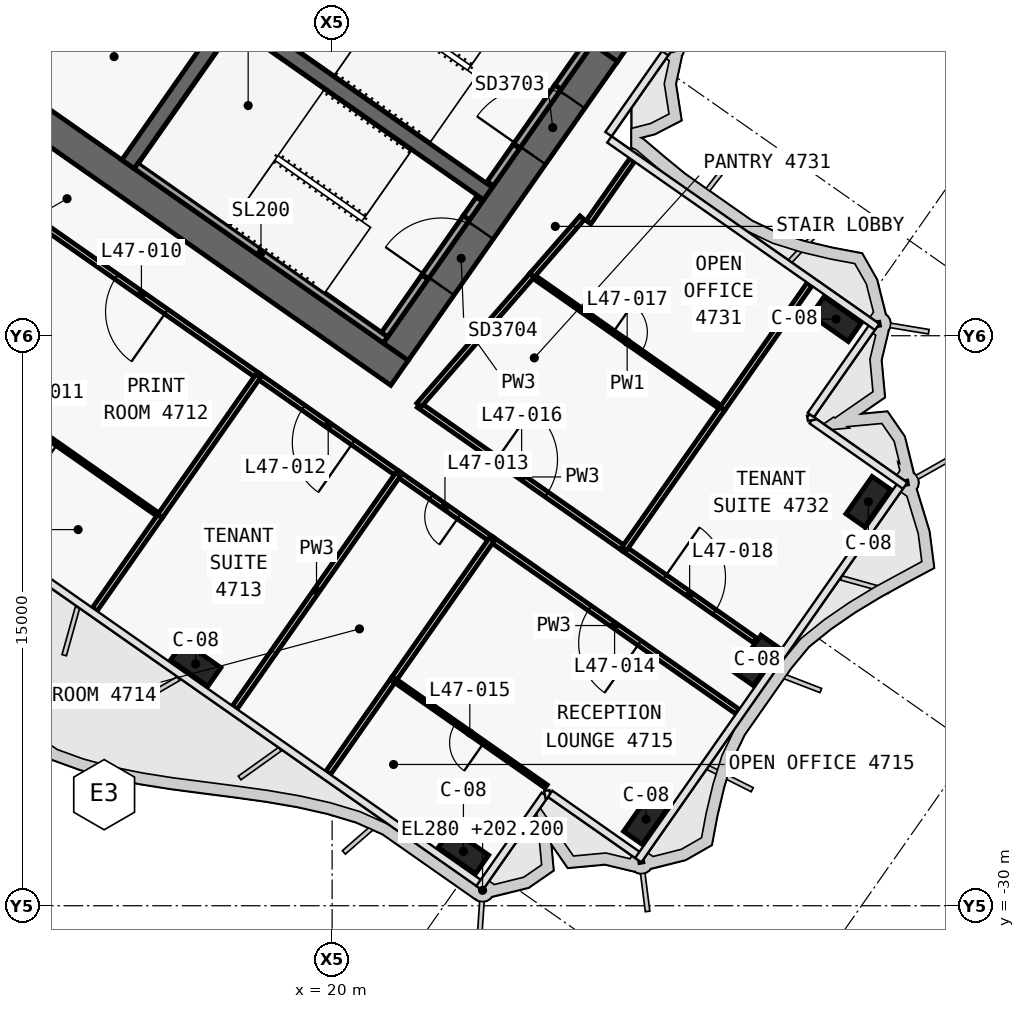
"""IFC4 building model, lengths in metres.
Left out: names, types, materials, properties, quantities, classifications, styles, units other than length and angle.
Written with IfcOpenShell. Run it as: python <this file> out.ifc"""

import sys

from ifc_helpers import new_model, si_unit, direction, frame, frame_2d, origin, origin_2d, place, context, subcontext, project, spatial, polyline, rectangle, outline, extrude, element, fill, save


model = new_model("IFC4")
c1 = context("Model", 3, precision=1e-05, world=origin(), true_north=direction((0.0, 1.0)))
c2 = subcontext(c1, "Body", "Model", "MODEL_VIEW")
j1 = project(units=[si_unit("LENGTHUNIT", "METRE"), si_unit("PLANEANGLEUNIT", "RADIAN")], contexts=[c1])
p1 = place(None, origin())
s1 = spatial("IfcSite", under=j1, at=p1, CompositionType="ELEMENT")
p2 = place(p1, origin())
s2 = spatial("IfcBuilding", under=s1, at=p2, CompositionType="ELEMENT")
p3 = place(p2, frame((0.0, 0.0, 202.2)))
s3 = spatial("IfcBuildingStorey", under=s2, at=p3, CompositionType="ELEMENT", Elevation=202.2)
p4 = place(p3, frame((-0.029, 11.984, 0.0), z_axis=(0.0, 0.0, 1.0), x_axis=(0.819151382952, -0.573577380837, 0.0)))
e1 = element("IfcWall", 1, at=p4, inside=s3, PredefinedType="SHEAR", context=c2, shape_type="SweptSolid", body=[
    extrude(outline(polyline([(33.898, 0.4), (-0.0, 0.4), (0.56, -0.4), (33.898, -0.4), (33.898, 0.4)])), origin(), (0.0, 0.0, 1.0), 3.9),
])
p5 = place(p3, frame((-0.029, -0.712, 0.0), z_axis=(0.0, 0.0, 1.0), x_axis=(0.819151758019, -0.573576845187, 0.0)))
e2 = element("IfcWall", 2, at=p5, inside=s3, PredefinedType="SHEAR", context=c2, shape_type="SweptSolid", body=[
    extrude(outline(polyline([(26.616, 0.4), (-0.0, 0.4), (0.56, -0.4), (26.616, -0.4), (26.616, 0.4)])), origin(), (0.0, 0.0, 1.0), 3.9),
])
p6 = place(p5, frame((0.966, 0.0, 0.0)))
e3 = element("IfcOpeningElement", 3, at=p6, cuts=e2, PredefinedType="OPENING", context=c2, shape_type="SweptSolid", body=[
    extrude(rectangle(XDim=1.5, YDim=2.1, at=frame_2d((0.75, 1.05))), frame((0.0, 0.41, 0.0), z_axis=(0.0, -1.0, 0.0), x_axis=(1.0, 0.0, 0.0)), (0.0, 0.0, 1.0), 0.82),
])
p7 = place(p5, frame((12.366, 0.0, 0.0)))
e4 = element("IfcOpeningElement", 4, at=p7, cuts=e2, PredefinedType="OPENING", context=c2, shape_type="SweptSolid", body=[
    extrude(rectangle(XDim=1.5, YDim=2.1, at=frame_2d((0.75, 1.05))), frame((0.0, 0.41, 0.0), z_axis=(0.0, -1.0, 0.0), x_axis=(1.0, 0.0, 0.0)), (0.0, 0.0, 1.0), 0.82),
])
p8 = place(p3, frame((21.675, -15.421, 0.0), z_axis=(0.0, 0.0, 1.0), x_axis=(0.573581815061, 0.819148278049, 0.0)))
e5 = element("IfcWall", 5, at=p8, inside=s3, PredefinedType="SHEAR", context=c2, shape_type="SweptSolid", body=[
    extrude(outline(polyline([(9.6, 0.4), (0.0, 0.4), (0.0, -0.4), (9.6, -0.4), (9.6, 0.4)])), origin(), (0.0, 0.0, 1.0), 3.9),
])
p9 = place(p8, frame((6.3, 0.0, 0.0)))
e6 = element("IfcOpeningElement", 6, at=p9, cuts=e5, PredefinedType="OPENING", context=c2, shape_type="SweptSolid", body=[
    extrude(rectangle(XDim=1.8, YDim=2.1, at=frame_2d((0.9, 1.05))), frame((0.0, 0.41, 0.0), z_axis=(0.0, -1.0, 0.0), x_axis=(1.0, 0.0, 0.0)), (0.0, 0.0, 1.0), 0.82),
])
p10 = place(p8, frame((2.1, 0.0, 0.0)))
e7 = element("IfcOpeningElement", 7, at=p10, cuts=e5, PredefinedType="OPENING", context=c2, shape_type="SweptSolid", body=[
    extrude(rectangle(XDim=1.8, YDim=2.1, at=frame_2d((0.9, 1.05))), frame((0.0, 0.41, 0.0), z_axis=(0.0, -1.0, 0.0), x_axis=(1.0, 0.0, 0.0)), (0.0, 0.0, 1.0), 0.82),
])
p11 = place(p3, frame((14.63, -10.488, 0.0), z_axis=(0.0, 0.0, 1.0), x_axis=(0.573611936273, 0.819127185829, 0.0)))
e8 = element("IfcWall", 8, at=p11, inside=s3, PredefinedType="SHEAR", context=c2, shape_type="SweptSolid", body=[
    extrude(outline(polyline([(0.0, 0.2), (0.0, -0.2), (4.6, -0.2), (4.6, 0.2), (0.0, 0.2)])), origin(), (0.0, 0.0, 1.0), 3.9),
])
p12 = place(p3, frame((2.638, 3.768, 0.0), z_axis=(0.0, 0.0, 1.0), x_axis=(0.81915267502, -0.573575535572, 0.0)))
e9 = element("IfcWall", 9, at=p12, inside=s3, PredefinedType="SHEAR", context=c2, shape_type="SweptSolid", body=[
    extrude(outline(polyline([(0.0, 0.2), (0.0, -0.2), (26.2, -0.2), (26.2, 0.2), (0.0, 0.2)])), origin(), (0.0, 0.0, 1.0), 3.9),
])
p13 = place(p12, frame((9.637, 0.0, 0.0)))
e10 = element("IfcOpeningElement", 10, at=p13, cuts=e9, PredefinedType="OPENING", context=c2, shape_type="SweptSolid", body=[
    extrude(rectangle(XDim=1.2, YDim=2.1, at=frame_2d((0.6, 1.05))), frame((0.0, 0.21, 0.0), z_axis=(0.0, -1.0, 0.0), x_axis=(1.0, 0.0, 0.0)), (0.0, 0.0, 1.0), 0.42),
])
p14 = place(p12, frame((11.812, 0.0, 0.0)))
e11 = element("IfcOpeningElement", 11, at=p14, cuts=e9, PredefinedType="OPENING", context=c2, shape_type="SweptSolid", body=[
    extrude(rectangle(XDim=1.2, YDim=2.1, at=frame_2d((0.6, 1.05))), frame((0.0, 0.21, 0.0), z_axis=(0.0, -1.0, 0.0), x_axis=(1.0, 0.0, 0.0)), (0.0, 0.0, 1.0), 0.42),
])
p15 = place(p12, frame((13.988, 0.0, 0.0)))
e12 = element("IfcOpeningElement", 12, at=p15, cuts=e9, PredefinedType="OPENING", context=c2, shape_type="SweptSolid", body=[
    extrude(rectangle(XDim=1.2, YDim=2.1, at=frame_2d((0.6, 1.05))), frame((0.0, 0.21, 0.0), z_axis=(0.0, -1.0, 0.0), x_axis=(1.0, 0.0, 0.0)), (0.0, 0.0, 1.0), 0.42),
])
p16 = place(p12, frame((16.262, 0.0, 0.0)))
e13 = element("IfcOpeningElement", 13, at=p16, cuts=e9, PredefinedType="OPENING", context=c2, shape_type="SweptSolid", body=[
    extrude(rectangle(XDim=1.0, YDim=2.1, at=frame_2d((0.5, 1.05))), frame((0.0, 0.21, 0.0), z_axis=(0.0, -1.0, 0.0), x_axis=(1.0, 0.0, 0.0)), (0.0, 0.0, 1.0), 0.42),
])
for number, where, z_axis, x_axis in (
    (14, (16.41, -23.637, 0.0), (0.0, 0.0, 1.0), (0.819, -0.574, 0.0)),
    (15, (23.455, -28.57, 0.0), (0.0, 0.0, 1.0), (0.819, -0.574, 0.0)),
    (16, (33.263, -14.562, 0.0), (0.0, 0.0, 1.0), (0.819, -0.574, 0.0)),
    (17, (28.26, -27.723, 0.0), (0.0, 0.0, 1.0), (0.574, 0.819, 0.0)),
    (18, (31.185, -23.545, 0.0), (0.0, 0.0, 1.0), (0.574, 0.819, 0.0)),
    (19, (34.11, -19.367, 0.0), (0.0, 0.0, 1.0), (0.574, 0.819, 0.0)),
):
    element("IfcColumn", number, at=place(p3, frame(where, z_axis=z_axis, x_axis=x_axis)), inside=s3, PredefinedType="COLUMN", context=c2, shape_type="SweptSolid", body=[
        extrude(rectangle(XDim=1.2, YDim=0.6, at=origin_2d()), origin(), (0.0, 0.0, 1.0), 3.9),
    ])
p17 = place(p3, frame((24.162, -10.998, 0.0), z_axis=(0.0, 0.0, 1.0), x_axis=(0.573612502218, 0.819126789514, 0.0)))
e20 = element("IfcWall", 20, at=p17, inside=s3, PredefinedType="SOLIDWALL", context=c2, shape_type="SweptSolid", body=[
    extrude(rectangle(XDim=1.2, YDim=0.2, at=frame_2d((0.6, 0.0))), origin(), (0.0, 0.0, 1.0), 3.62),
])
p18 = place(p3, frame((25.94, -8.458, 0.0), z_axis=(0.0, 0.0, 1.0), x_axis=(0.573619628835, 0.819121798889, 0.0)))
e21 = element("IfcWall", 21, at=p18, inside=s3, PredefinedType="SOLIDWALL", context=c2, shape_type="SweptSolid", body=[
    extrude(rectangle(XDim=1.25, YDim=0.2, at=frame_2d((0.625, 0.0))), origin(), (0.0, 0.0, 1.0), 3.62),
])
p19 = place(p3, frame((24.85, -10.014, 2.15), z_axis=(0.0, 0.0, 1.0), x_axis=(0.573505465124, 0.819201734296, 0.0)))
e22 = element("IfcWall", 22, at=p19, inside=s3, PredefinedType="SOLIDWALL", context=c2, shape_type="SweptSolid", body=[
    extrude(rectangle(XDim=1.9, YDim=0.2, at=frame_2d((0.95, 0.0))), origin(), (0.0, 0.0, 1.0), 1.47),
])
p20 = place(p3, frame((14.851, -10.521, 0.0), z_axis=(0.0, 0.0, 1.0), x_axis=(0.819141584393, -0.57359137434, 0.0)))
e23 = element("IfcWall", 23, at=p20, inside=s3, PredefinedType="SOLIDWALL", context=c2, shape_type="SweptSolid", body=[
    extrude(rectangle(XDim=8.0, YDim=0.2, at=frame_2d((4.0, 0.0))), origin(), (0.0, 0.0, 1.0), 3.62),
])
p21 = place(p3, frame((21.38, -14.97, 0.0), z_axis=(0.0, 0.0, 1.0), x_axis=(0.573559770908, 0.819163713305, 0.0)))
e24 = element("IfcWall", 24, at=p21, inside=s3, PredefinedType="SOLIDWALL", context=c2, shape_type="SweptSolid", body=[
    extrude(rectangle(XDim=1.85, YDim=0.2, at=frame_2d((0.925, 0.0))), origin(), (0.0, 0.0, 1.0), 3.62),
])
p22 = place(p3, frame((23.531, -11.898, 0.0), z_axis=(0.0, 0.0, 1.0), x_axis=(0.573708088123, 0.819059844958, 0.0)))
e25 = element("IfcWall", 25, at=p22, inside=s3, PredefinedType="SOLIDWALL", context=c2, shape_type="SweptSolid", body=[
    extrude(rectangle(XDim=0.6, YDim=0.2, at=frame_2d((0.3, 0.0))), origin(), (0.0, 0.0, 1.0), 3.62),
])
p23 = place(p3, frame((22.441, -13.455, 2.15), z_axis=(0.0, 0.0, 1.0), x_axis=(0.573591692345, 0.819141361715, 0.0)))
e26 = element("IfcWall", 26, at=p23, inside=s3, PredefinedType="SOLIDWALL", context=c2, shape_type="SweptSolid", body=[
    extrude(rectangle(XDim=1.9, YDim=0.2, at=frame_2d((0.95, 0.0))), origin(), (0.0, 0.0, 1.0), 1.47),
])
p24 = place(p3, frame((22.283, -16.824, 0.0), z_axis=(0.0, 0.0, 1.0), x_axis=(0.819157174053, -0.573569110219, 0.0)))
e27 = element("IfcWall", 27, at=p24, inside=s3, PredefinedType="PARTITIONING", context=c2, shape_type="SweptSolid", body=[
    extrude(rectangle(XDim=6.599, YDim=0.15, at=frame_2d((3.299, 0.0))), origin(), (0.0, 0.0, 1.0), 3.62),
])
p25 = place(p24, frame((2.5, 0.0, 0.0)))
e28 = element("IfcOpeningElement", 28, at=p25, cuts=e27, PredefinedType="OPENING", context=c2, shape_type="SweptSolid", body=[
    extrude(rectangle(XDim=1.6, YDim=2.1, at=frame_2d((0.8, 1.05))), frame((0.0, 0.085, 0.0), z_axis=(0.0, -1.0, 0.0), x_axis=(1.0, 0.0, 0.0)), (0.0, 0.0, 1.0), 0.17),
])
p26 = place(p3, frame((27.686, -20.606, 0.0), z_axis=(0.0, 0.0, 1.0), x_axis=(0.81915821587, -0.573567622319, 0.0)))
e29 = element("IfcWall", 29, at=p26, inside=s3, PredefinedType="PARTITIONING", context=c2, shape_type="SweptSolid", body=[
    extrude(rectangle(XDim=4.202, YDim=0.15, at=frame_2d((2.101, 0.0))), origin(), (0.0, 0.0, 1.0), 3.0),
])
p27 = place(p26, frame((1.301, 0.0, 0.0)))
e30 = element("IfcOpeningElement", 30, at=p27, cuts=e29, PredefinedType="OPENING", context=c2, shape_type="SweptSolid", body=[
    extrude(rectangle(XDim=1.6, YDim=2.1, at=frame_2d((0.8, 1.05))), frame((0.0, 0.085, 0.0), z_axis=(0.0, -1.0, 0.0), x_axis=(1.0, 0.0, 0.0)), (0.0, 0.0, 1.0), 0.17),
])
p28 = place(p3, frame((18.055, -16.061, 0.0), z_axis=(0.0, 0.0, 1.0), x_axis=(-0.819164661457, 0.573558416746, 0.0)))
e31 = element("IfcWall", 31, at=p28, inside=s3, PredefinedType="PARTITIONING", context=c2, shape_type="SweptSolid", body=[
    extrude(rectangle(XDim=7.504, YDim=0.15, at=frame_2d((3.752, 0.0))), origin(), (0.0, 0.0, 1.0), 3.0),
])
p29 = place(p28, frame((2.952, 0.0, 0.0)))
e32 = element("IfcOpeningElement", 32, at=p29, cuts=e31, PredefinedType="OPENING", context=c2, shape_type="SweptSolid", body=[
    extrude(rectangle(XDim=1.6, YDim=2.1, at=frame_2d((0.8, 1.05))), frame((0.0, 0.085, 0.0), z_axis=(0.0, -1.0, 0.0), x_axis=(1.0, 0.0, 0.0)), (0.0, 0.0, 1.0), 0.17),
])
p30 = place(p3, frame((21.741, -18.642, 0.0), z_axis=(0.0, 0.0, 1.0), x_axis=(-0.819165703328, 0.573556928727, 0.0)))
e33 = element("IfcWall", 33, at=p30, inside=s3, PredefinedType="PARTITIONING", context=c2, shape_type="SweptSolid", body=[
    extrude(rectangle(XDim=4.504, YDim=0.15, at=frame_2d((2.252, 0.0))), origin(), (0.0, 0.0, 1.0), 3.0),
])
p31 = place(p30, frame((1.452, 0.0, 0.0)))
e34 = element("IfcOpeningElement", 34, at=p31, cuts=e33, PredefinedType="OPENING", context=c2, shape_type="SweptSolid", body=[
    extrude(rectangle(XDim=1.6, YDim=2.1, at=frame_2d((0.8, 1.05))), frame((0.0, 0.085, 0.0), z_axis=(0.0, -1.0, 0.0), x_axis=(1.0, 0.0, 0.0)), (0.0, 0.0, 1.0), 0.17),
])
p32 = place(p3, frame((24.199, -20.362, 0.0), z_axis=(0.0, 0.0, 1.0), x_axis=(-0.81916700466, 0.573555070134, 0.0)))
e35 = element("IfcWall", 35, at=p32, inside=s3, PredefinedType="PARTITIONING", context=c2, shape_type="SweptSolid", body=[
    extrude(rectangle(XDim=3.004, YDim=0.15, at=frame_2d((1.502, 0.0))), origin(), (0.0, 0.0, 1.0), 3.62),
])
p33 = place(p32, frame((1.052, 0.0, 0.0)))
e36 = element("IfcOpeningElement", 36, at=p33, cuts=e35, PredefinedType="OPENING", context=c2, shape_type="SweptSolid", body=[
    extrude(rectangle(XDim=0.9, YDim=2.1, at=frame_2d((0.45, 1.05))), frame((0.0, 0.085, 0.0), z_axis=(0.0, -1.0, 0.0), x_axis=(1.0, 0.0, 0.0)), (0.0, 0.0, 1.0), 0.17),
])
p34 = place(p3, frame((30.669, -24.893, 0.0), z_axis=(0.0, 0.0, 1.0), x_axis=(-0.8191564378, 0.573570161716, 0.0)))
e37 = element("IfcWall", 37, at=p34, inside=s3, PredefinedType="PARTITIONING", context=c2, shape_type="SweptSolid", body=[
    extrude(rectangle(XDim=7.902, YDim=0.15, at=frame_2d((3.951, 0.0))), origin(), (0.0, 0.0, 1.0), 2.9),
])
p35 = place(p34, frame((3.151, 0.0, 0.0)))
e38 = element("IfcOpeningElement", 38, at=p35, cuts=e37, PredefinedType="OPENING", context=c2, shape_type="SweptSolid", body=[
    extrude(rectangle(XDim=1.6, YDim=2.1, at=frame_2d((0.8, 1.05))), frame((0.0, 0.085, 0.0), z_axis=(0.0, -1.0, 0.0), x_axis=(1.0, 0.0, 0.0)), (0.0, 0.0, 1.0), 0.17),
])
p36 = place(p3, frame((25.258, -13.412, 0.0), z_axis=(0.0, 0.0, 1.0), x_axis=(0.819160668254, -0.573564119855, 0.0)))
e39 = element("IfcWall", 39, at=p36, inside=s3, PredefinedType="PARTITIONING", context=c2, shape_type="SweptSolid", body=[
    extrude(rectangle(XDim=6.117, YDim=0.1, at=frame_2d((3.059, 0.0))), origin(), (0.0, 0.0, 1.0), 3.62),
])
p37 = place(p36, frame((2.609, 0.0, 0.0)))
e40 = element("IfcOpeningElement", 40, at=p37, cuts=e39, PredefinedType="OPENING", context=c2, shape_type="SweptSolid", body=[
    extrude(rectangle(XDim=0.9, YDim=2.1, at=frame_2d((0.45, 1.05))), frame((0.0, 0.06, 0.0), z_axis=(0.0, -1.0, 0.0), x_axis=(1.0, 0.0, 0.0)), (0.0, 0.0, 1.0), 0.12),
])
p38 = place(p3, frame((32.562, -13.645, 0.0), z_axis=(0.0, 0.0, 1.0), x_axis=(-0.573589359699, -0.819142995112, 0.0)))
e41 = element("IfcWall", 41, at=p38, inside=s3, PredefinedType="PARTITIONING", context=c2, shape_type="SweptSolid", body=[
    extrude(rectangle(XDim=3.999, YDim=0.15, at=frame_2d((2.0, 0.0))), origin(), (0.0, 0.0, 1.0), 3.0),
])
p39 = place(p3, frame((25.258, -13.412, 0.0), z_axis=(0.0, 0.0, 1.0), x_axis=(0.656791883473, 0.75407189432, 0.0)))
e42 = element("IfcWall", 42, at=p39, inside=s3, PredefinedType="PARTITIONING", context=c2, shape_type="SweptSolid", body=[
    extrude(rectangle(XDim=2.01, YDim=0.15, at=frame_2d((1.005, 0.0))), origin(), (0.0, 0.0, 1.0), 3.62),
])
p40 = place(p3, frame((26.746, -12.014, 0.0), z_axis=(0.0, 0.0, 1.0), x_axis=(0.573568836472, 0.819157365729, 0.0)))
e43 = element("IfcWall", 43, at=p40, inside=s3, PredefinedType="PARTITIONING", context=c2, shape_type="SweptSolid", body=[
    extrude(rectangle(XDim=2.0, YDim=0.15, at=frame_2d((1.0, 0.0))), origin(), (0.0, 0.0, 1.0), 3.0),
])
p41 = place(p3, frame((30.268, -16.921, 0.0), z_axis=(0.0, 0.0, 1.0), x_axis=(-0.573586141663, -0.819145248471, 0.0)))
e44 = element("IfcWall", 44, at=p41, inside=s3, PredefinedType="PARTITIONING", context=c2, shape_type="SweptSolid", body=[
    extrude(rectangle(XDim=4.5, YDim=0.15, at=frame_2d((2.25, 0.0))), origin(), (0.0, 0.0, 1.0), 3.62),
])
p42 = place(p3, frame((22.285, -16.825, 0.0), z_axis=(0.0, 0.0, 1.0), x_axis=(0.656764910052, 0.754095387152, 0.0)))
e45 = element("IfcWall", 45, at=p42, inside=s3, PredefinedType="PARTITIONING", context=c2, shape_type="SweptSolid", body=[
    extrude(rectangle(XDim=4.525, YDim=0.15, at=frame_2d((2.263, 0.0))), origin(), (0.0, 0.0, 1.0), 3.62),
])
p43 = place(p3, frame((15.472, -19.747, 0.0), z_axis=(0.0, 0.0, 1.0), x_axis=(-0.819137093595, 0.573597787563, 0.0)))
e46 = element("IfcWall", 46, at=p43, inside=s3, PredefinedType="PARTITIONING", context=c2, shape_type="SweptSolid", body=[
    extrude(rectangle(XDim=7.5, YDim=0.1, at=frame_2d((3.75, 0.0))), origin(), (0.0, 0.0, 1.0), 3.0),
])
p44 = place(p43, frame((3.3, 0.0, 0.0)))
e47 = element("IfcOpeningElement", 47, at=p44, cuts=e46, PredefinedType="OPENING", context=c2, shape_type="SweptSolid", body=[
    extrude(rectangle(XDim=0.9, YDim=2.1, at=frame_2d((0.45, 1.05))), frame((0.0, 0.06, 0.0), z_axis=(0.0, -1.0, 0.0), x_axis=(1.0, 0.0, 0.0)), (0.0, 0.0, 1.0), 0.12),
])
p45 = place(p3, frame((15.472, -19.747, 0.0), z_axis=(0.0, 0.0, 1.0), x_axis=(-0.573604390867, -0.819132469615, 0.0)))
e48 = element("IfcWall", 48, at=p45, inside=s3, PredefinedType="PARTITIONING", context=c2, shape_type="SweptSolid", body=[
    extrude(rectangle(XDim=2.999, YDim=0.15, at=frame_2d((1.5, 0.0))), origin(), (0.0, 0.0, 1.0), 2.9),
])
p46 = place(p3, frame((18.054, -16.06, 0.0), z_axis=(0.0, 0.0, 1.0), x_axis=(-0.573622545156, -0.819119756622, 0.0)))
e49 = element("IfcWall", 49, at=p46, inside=s3, PredefinedType="PARTITIONING", context=c2, shape_type="SweptSolid", body=[
    extrude(rectangle(XDim=4.5, YDim=0.15, at=frame_2d((2.25, 0.0))), origin(), (0.0, 0.0, 1.0), 3.62),
])
p47 = place(p3, frame((21.74, -18.641, 0.0), z_axis=(0.0, 0.0, 1.0), x_axis=(-0.573575945067, -0.81915238829, 0.0)))
e50 = element("IfcWall", 50, at=p47, inside=s3, PredefinedType="PARTITIONING", context=c2, shape_type="SweptSolid", body=[
    extrude(rectangle(XDim=7.5, YDim=0.15, at=frame_2d((3.75, 0.0))), origin(), (0.0, 0.0, 1.0), 2.9),
])
p48 = place(p3, frame((21.617, -24.047, 0.0), z_axis=(0.0, 0.0, 1.0), x_axis=(-0.573555162214, -0.819166940189, 0.0)))
e51 = element("IfcWall", 51, at=p48, inside=s3, PredefinedType="PARTITIONING", context=c2, shape_type="SweptSolid", body=[
    extrude(rectangle(XDim=3.001, YDim=0.15, at=frame_2d((1.5, 0.0))), origin(), (0.0, 0.0, 1.0), 2.9),
])
p49 = place(p3, frame((24.197, -20.361, 0.0), z_axis=(0.0, 0.0, 1.0), x_axis=(-0.573589723117, -0.819142740634, 0.0)))
e52 = element("IfcWall", 52, at=p49, inside=s3, PredefinedType="PARTITIONING", context=c2, shape_type="SweptSolid", body=[
    extrude(rectangle(XDim=4.502, YDim=0.15, at=frame_2d((2.251, 0.0))), origin(), (0.0, 0.0, 1.0), 3.62),
])
p50 = place(p3, frame((25.629, -26.859, 0.0), z_axis=(0.0, 0.0, 1.0), x_axis=(-0.819154669329, 0.573572687386, 0.0)))
e53 = element("IfcWall", 53, at=p50, inside=s3, PredefinedType="PARTITIONING", context=c2, shape_type="SweptSolid", body=[
    extrude(rectangle(XDim=4.9, YDim=0.1, at=frame_2d((2.45, 0.0))), origin(), (0.0, 0.0, 1.0), 3.0),
])
p51 = place(p50, frame((2.0, 0.0, 0.0)))
e54 = element("IfcOpeningElement", 54, at=p51, cuts=e53, PredefinedType="OPENING", context=c2, shape_type="SweptSolid", body=[
    extrude(rectangle(XDim=0.9, YDim=2.1, at=frame_2d((0.45, 1.05))), frame((0.0, 0.06, 0.0), z_axis=(0.0, -1.0, 0.0), x_axis=(1.0, 0.0, 0.0)), (0.0, 0.0, 1.0), 0.12),
])
p52 = place(p9, origin())
e55 = element("IfcDoor", 55, at=p52, inside=s3, OperationType="DOUBLE_DOOR_SINGLE_SWING", PredefinedType="DOOR", context=c2, shape_type="SweptSolid", body=[
    extrude(rectangle(XDim=1.8, YDim=2.1, at=frame_2d((0.9, 1.05))), frame((0.0, 0.025, 0.0), z_axis=(0.0, -1.0, 0.0), x_axis=(1.0, 0.0, 0.0)), (0.0, 0.0, 1.0), 0.05),
])
fill(e6, e55)
p53 = place(p10, origin())
e56 = element("IfcDoor", 56, at=p53, inside=s3, OperationType="DOUBLE_DOOR_SINGLE_SWING", PredefinedType="DOOR", context=c2, shape_type="SweptSolid", body=[
    extrude(rectangle(XDim=1.8, YDim=2.1, at=frame_2d((0.9, 1.05))), frame((0.0, 0.025, 0.0), z_axis=(0.0, -1.0, 0.0), x_axis=(1.0, 0.0, 0.0)), (0.0, 0.0, 1.0), 0.05),
])
fill(e7, e56)
p54 = place(p29, origin())
e57 = element("IfcDoor", 57, at=p54, inside=s3, OperationType="DOUBLE_DOOR_SINGLE_SWING", PredefinedType="DOOR", context=c2, shape_type="SweptSolid", body=[
    extrude(rectangle(XDim=1.6, YDim=2.1, at=frame_2d((0.8, 1.05))), frame((0.0, 0.025, 0.0), z_axis=(0.0, -1.0, 0.0), x_axis=(1.0, 0.0, 0.0)), (0.0, 0.0, 1.0), 0.05),
])
fill(e32, e57)
p55 = place(p44, origin())
e58 = element("IfcDoor", 58, at=p55, inside=s3, OperationType="SINGLE_SWING_LEFT", PredefinedType="DOOR", context=c2, shape_type="SweptSolid", body=[
    extrude(rectangle(XDim=0.9, YDim=2.1, at=frame_2d((0.45, 1.05))), frame((0.0, 0.025, 0.0), z_axis=(0.0, -1.0, 0.0), x_axis=(1.0, 0.0, 0.0)), (0.0, 0.0, 1.0), 0.05),
])
fill(e47, e58)
p56 = place(p31, origin())
e59 = element("IfcDoor", 59, at=p56, inside=s3, OperationType="DOUBLE_DOOR_SINGLE_SWING", PredefinedType="DOOR", context=c2, shape_type="SweptSolid", body=[
    extrude(rectangle(XDim=1.6, YDim=2.1, at=frame_2d((0.8, 1.05))), frame((0.0, 0.025, 0.0), z_axis=(0.0, -1.0, 0.0), x_axis=(1.0, 0.0, 0.0)), (0.0, 0.0, 1.0), 0.05),
])
fill(e34, e59)
p57 = place(p33, origin())
e60 = element("IfcDoor", 60, at=p57, inside=s3, OperationType="SINGLE_SWING_RIGHT", PredefinedType="DOOR", context=c2, shape_type="SweptSolid", body=[
    extrude(rectangle(XDim=0.9, YDim=2.1, at=frame_2d((0.45, 1.05))), frame((0.0, 0.025, 0.0), z_axis=(0.0, -1.0, 0.0), x_axis=(1.0, 0.0, 0.0)), (0.0, 0.0, 1.0), 0.05),
])
fill(e36, e60)
p58 = place(p35, origin())
e61 = element("IfcDoor", 61, at=p58, inside=s3, OperationType="DOUBLE_DOOR_SINGLE_SWING", PredefinedType="DOOR", context=c2, shape_type="SweptSolid", body=[
    extrude(rectangle(XDim=1.6, YDim=2.1, at=frame_2d((0.8, 1.05))), frame((0.0, 0.025, 0.0), z_axis=(0.0, -1.0, 0.0), x_axis=(1.0, 0.0, 0.0)), (0.0, 0.0, 1.0), 0.05),
])
fill(e38, e61)
p59 = place(p51, origin())
e62 = element("IfcDoor", 62, at=p59, inside=s3, OperationType="SINGLE_SWING_RIGHT", PredefinedType="DOOR", context=c2, shape_type="SweptSolid", body=[
    extrude(rectangle(XDim=0.9, YDim=2.1, at=frame_2d((0.45, 1.05))), frame((0.0, 0.025, 0.0), z_axis=(0.0, -1.0, 0.0), x_axis=(1.0, 0.0, 0.0)), (0.0, 0.0, 1.0), 0.05),
])
fill(e54, e62)
p60 = place(p25, origin())
e63 = element("IfcDoor", 63, at=p60, inside=s3, OperationType="DOUBLE_DOOR_SINGLE_SWING", PredefinedType="DOOR", context=c2, shape_type="SweptSolid", body=[
    extrude(rectangle(XDim=1.6, YDim=2.1, at=frame_2d((0.8, 1.05))), frame((0.0, 0.025, 0.0), z_axis=(0.0, -1.0, 0.0), x_axis=(1.0, 0.0, 0.0)), (0.0, 0.0, 1.0), 0.05),
])
fill(e28, e63)
p61 = place(p37, origin())
e64 = element("IfcDoor", 64, at=p61, inside=s3, OperationType="SINGLE_SWING_RIGHT", PredefinedType="DOOR", context=c2, shape_type="SweptSolid", body=[
    extrude(rectangle(XDim=0.9, YDim=2.1, at=frame_2d((0.45, 1.05))), frame((0.0, 0.025, 0.0), z_axis=(0.0, -1.0, 0.0), x_axis=(1.0, 0.0, 0.0)), (0.0, 0.0, 1.0), 0.05),
])
fill(e40, e64)
p62 = place(p27, origin())
e65 = element("IfcDoor", 65, at=p62, inside=s3, OperationType="DOUBLE_DOOR_SINGLE_SWING", PredefinedType="DOOR", context=c2, shape_type="SweptSolid", body=[
    extrude(rectangle(XDim=1.6, YDim=2.1, at=frame_2d((0.8, 1.05))), frame((0.0, 0.025, 0.0), z_axis=(0.0, -1.0, 0.0), x_axis=(1.0, 0.0, 0.0)), (0.0, 0.0, 1.0), 0.05),
])
fill(e30, e65)
save(model, sys.argv[1])
